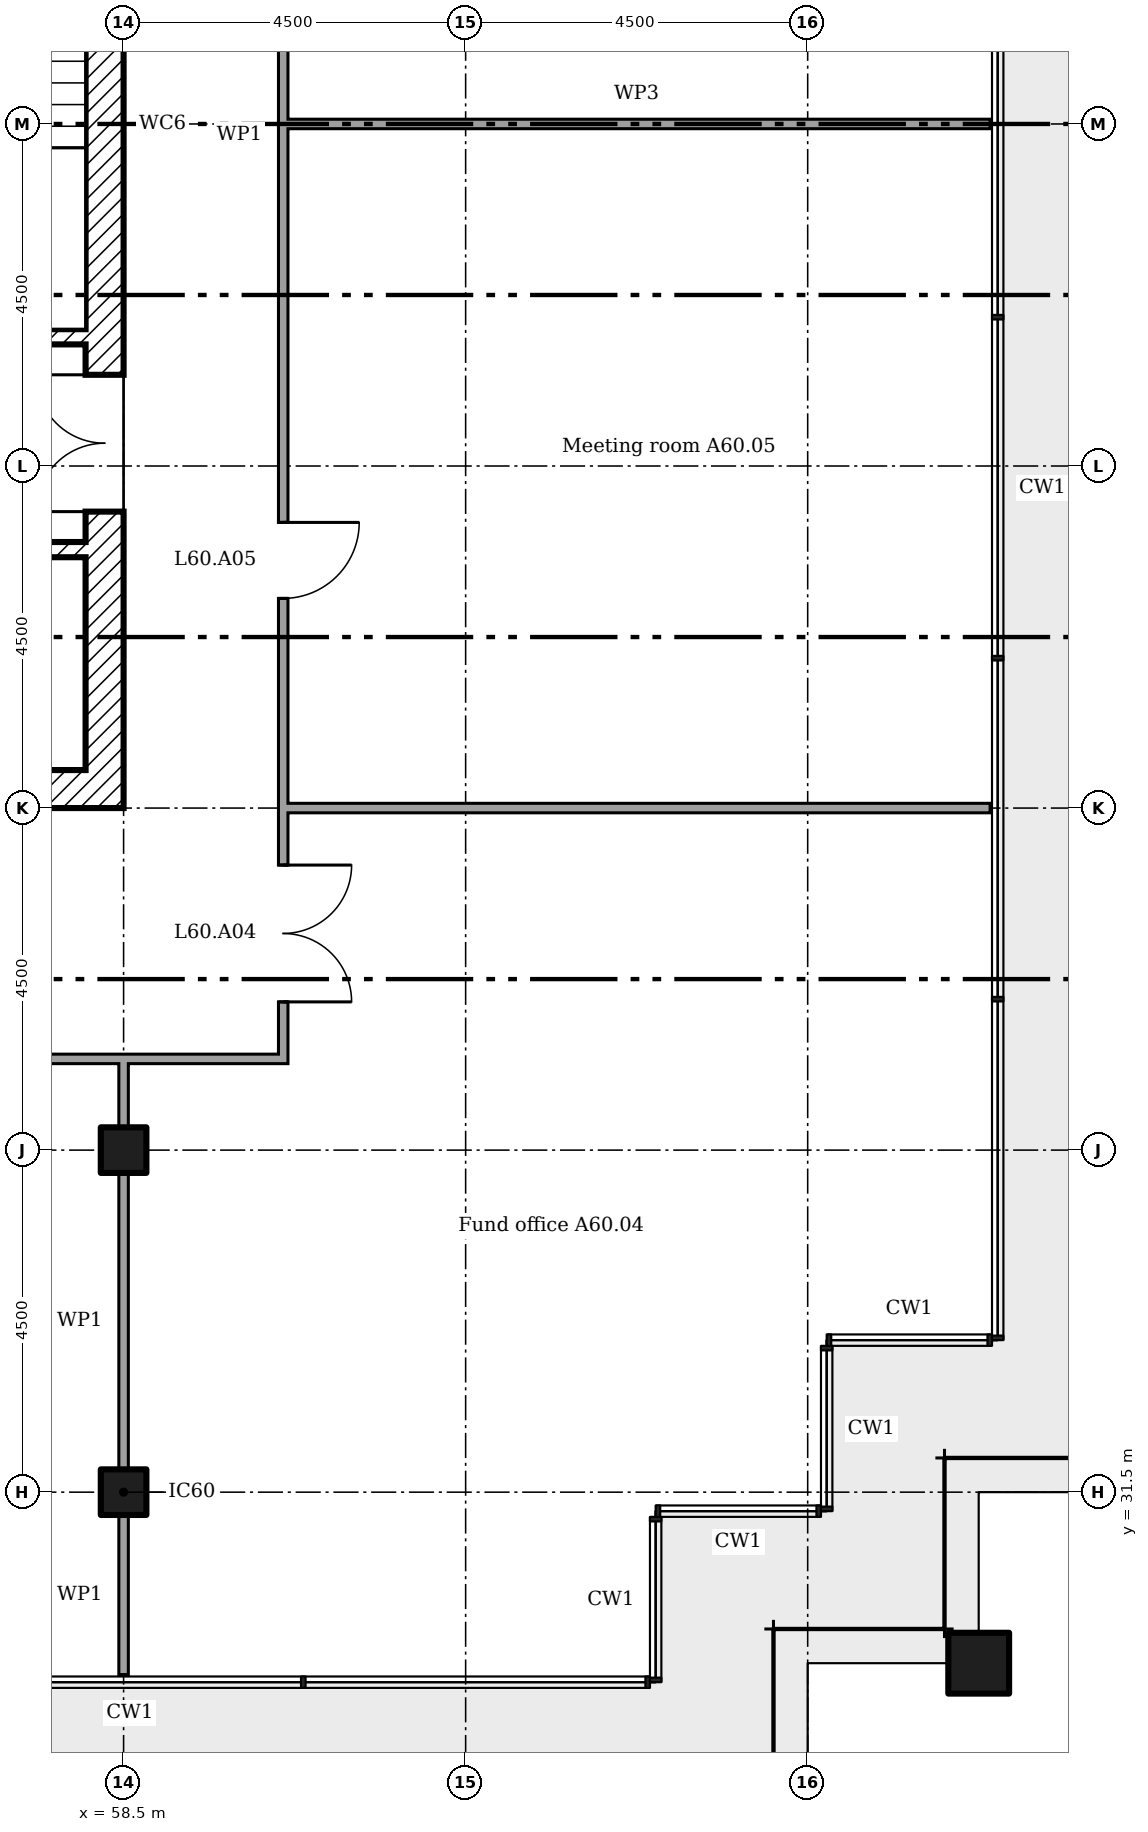
"""IFC4 building model, lengths in metres.
Left out: names, types, materials, properties, quantities, classifications, styles, units other than length and angle.
Written with IfcOpenShell. Run it as: python <this file> out.ifc"""

import sys

from ifc_helpers import new_model, si_unit, direction, frame, frame_2d, origin, origin_2d, place, context, subcontext, project, spatial, rectangle, extrude, element, fill, save


model = new_model("IFC4")
c1 = context("Model", 3, precision=1e-05, world=origin(), true_north=direction((0.0, 1.0)))
c2 = subcontext(c1, "Body", "Model", "MODEL_VIEW")
j1 = project(units=[si_unit("LENGTHUNIT", "METRE"), si_unit("PLANEANGLEUNIT", "RADIAN")], contexts=[c1])
p1 = place(None, origin())
s1 = spatial("IfcSite", under=j1, at=p1, CompositionType="ELEMENT")
p2 = place(p1, origin())
s2 = spatial("IfcBuilding", under=s1, at=p2, CompositionType="ELEMENT")
p3 = place(p2, frame((0.0, 0.0, 235.2)))
s3 = spatial("IfcBuildingStorey", under=s2, at=p3, CompositionType="ELEMENT", Elevation=235.2)
p4 = place(p3, frame((69.75, 29.25, 0.0)))
e1 = element("IfcColumn", 1, at=p4, inside=s3, PredefinedType="COLUMN", context=c2, shape_type="SweptSolid", body=[
    extrude(rectangle(XDim=0.8, YDim=0.8, at=origin_2d()), origin(), (0.0, 0.0, 1.0), 3.6),
])
for number, where in (
    (2, (58.5, 31.5, 0.0)),
    (3, (58.5, 36.0, 0.0)),
):
    element("IfcColumn", number, at=place(p3, frame(where)), inside=s3, PredefinedType="COLUMN", context=c2, shape_type="SweptSolid", body=[
        extrude(rectangle(XDim=0.6, YDim=0.6, at=origin_2d()), origin(), (0.0, 0.0, 1.0), 3.6),
    ])
p5 = place(p3, frame((58.25, 40.5, 0.0), z_axis=(0.0, 0.0, 1.0), x_axis=(0.0, 1.0, 0.0)))
e4 = element("IfcWall", 4, at=p5, inside=s3, PredefinedType="SHEAR", context=c2, shape_type="SweptSolid", body=[
    extrude(rectangle(XDim=18.0, YDim=0.5, at=frame_2d((9.0, 0.0))), origin(), (0.0, 0.0, 1.0), 3.35),
])
p6 = place(p5, frame((13.15, 0.0, 0.0)))
e5 = element("IfcOpeningElement", 5, at=p6, cuts=e4, PredefinedType="OPENING", context=c2, shape_type="SweptSolid", body=[
    extrude(rectangle(XDim=1.2, YDim=2.1, at=frame_2d((0.6, 1.05))), frame((0.0, 0.26, 0.0), z_axis=(0.0, -1.0, 0.0), x_axis=(1.0, 0.0, 0.0)), (0.0, 0.0, 1.0), 0.52),
])
p7 = place(p5, frame((3.9, 0.0, 0.0)))
e6 = element("IfcOpeningElement", 6, at=p7, cuts=e4, PredefinedType="OPENING", context=c2, shape_type="SweptSolid", body=[
    extrude(rectangle(XDim=1.8, YDim=2.1, at=frame_2d((0.9, 1.05))), frame((0.0, 0.26, 0.0), z_axis=(0.0, -1.0, 0.0), x_axis=(1.0, 0.0, 0.0)), (0.0, 0.0, 1.0), 0.52),
])
p8 = place(p5, frame((11.525, 0.0, 0.0)))
e7 = element("IfcOpeningElement", 7, at=p8, cuts=e4, PredefinedType="OPENING", context=c2, shape_type="SweptSolid", body=[
    extrude(rectangle(XDim=1.0, YDim=2.1, at=frame_2d((0.5, 1.05))), frame((0.0, 0.26, 0.0), z_axis=(0.0, -1.0, 0.0), x_axis=(1.0, 0.0, 0.0)), (0.0, 0.0, 1.0), 0.52),
])
p9 = place(p3, frame((40.5, 40.75, 0.0)))
e8 = element("IfcWall", 8, at=p9, inside=s3, PredefinedType="SHEAR", context=c2, shape_type="SweptSolid", body=[
    extrude(rectangle(XDim=17.5, YDim=0.5, at=frame_2d((8.75, 0.0))), origin(), (0.0, 0.0, 1.0), 3.35),
])
p10 = place(p3, frame((41.0, 43.9, 0.0)))
e9 = element("IfcWall", 9, at=p10, inside=s3, PredefinedType="SHEAR", context=c2, shape_type="SweptSolid", body=[
    extrude(rectangle(XDim=17.0, YDim=0.2, at=frame_2d((8.5, 0.0))), origin(), (0.0, 0.0, 1.0), 3.35),
])
p11 = place(p10, frame((6.717, 0.0, 0.0)))
e10 = element("IfcOpeningElement", 10, at=p11, cuts=e9, PredefinedType="OPENING", context=c2, shape_type="SweptSolid", body=[
    extrude(rectangle(XDim=0.9, YDim=2.1, at=frame_2d((0.45, 1.05))), frame((0.0, 0.11, 0.0), z_axis=(0.0, -1.0, 0.0), x_axis=(1.0, 0.0, 0.0)), (0.0, 0.0, 1.0), 0.22),
])
p12 = place(p3, frame((54.8, 46.7, 0.0)))
e11 = element("IfcWall", 11, at=p12, inside=s3, PredefinedType="SHEAR", context=c2, shape_type="SweptSolid", body=[
    extrude(rectangle(XDim=3.2, YDim=0.2, at=frame_2d((1.6, 0.0))), origin(), (0.0, 0.0, 1.0), 3.35),
])
p13 = place(p3, frame((38.038, 37.2, 0.0)))
e12 = element("IfcWall", 12, at=p13, inside=s3, PredefinedType="PARTITIONING", context=c2, shape_type="SweptSolid", body=[
    extrude(rectangle(XDim=22.625, YDim=0.125, at=frame_2d((11.312, 0.0))), origin(), (0.0, 0.0, 1.0), 3.45),
])
p14 = place(p13, frame((0.762, 0.0, 0.0)))
e13 = element("IfcOpeningElement", 13, at=p14, cuts=e12, PredefinedType="OPENING", context=c2, shape_type="SweptSolid", body=[
    extrude(rectangle(XDim=1.0, YDim=2.1, at=frame_2d((0.5, 1.05))), frame((0.0, 0.073, 0.0), z_axis=(0.0, -1.0, 0.0), x_axis=(1.0, 0.0, 0.0)), (0.0, 0.0, 1.0), 0.145),
])
p15 = place(p13, frame((3.758, 0.0, 0.0)))
e14 = element("IfcOpeningElement", 14, at=p15, cuts=e12, PredefinedType="OPENING", context=c2, shape_type="SweptSolid", body=[
    extrude(rectangle(XDim=1.0, YDim=2.1, at=frame_2d((0.5, 1.05))), frame((0.0, 0.073, 0.0), z_axis=(0.0, -1.0, 0.0), x_axis=(1.0, 0.0, 0.0)), (0.0, 0.0, 1.0), 0.145),
])
p16 = place(p13, frame((14.702, 0.0, 0.0)))
e15 = element("IfcOpeningElement", 15, at=p16, cuts=e12, PredefinedType="OPENING", context=c2, shape_type="SweptSolid", body=[
    extrude(rectangle(XDim=1.8, YDim=2.1, at=frame_2d((0.9, 1.05))), frame((0.0, 0.073, 0.0), z_axis=(0.0, -1.0, 0.0), x_axis=(1.0, 0.0, 0.0)), (0.0, 0.0, 1.0), 0.145),
])
p17 = place(p3, frame((60.6, 40.5, 0.0)))
e16 = element("IfcWall", 16, at=p17, inside=s3, PredefinedType="PARTITIONING", context=c2, shape_type="SweptSolid", body=[
    extrude(rectangle(XDim=9.3, YDim=0.125, at=frame_2d((4.65, 0.0))), origin(), (0.0, 0.0, 1.0), 2.772),
])
p18 = place(p3, frame((60.6, 49.5, 0.0)))
e17 = element("IfcWall", 17, at=p18, inside=s3, PredefinedType="MOVABLE", context=c2, shape_type="SweptSolid", body=[
    extrude(rectangle(XDim=9.3, YDim=0.125, at=frame_2d((4.65, 0.0))), origin(), (0.0, 0.0, 1.0), 2.772),
])
p19 = place(p3, frame((58.5, 29.1, 0.0), z_axis=(0.0, 0.0, 1.0), x_axis=(0.0, 1.0, 0.0)))
e18 = element("IfcWall", 18, at=p19, inside=s3, PredefinedType="PARTITIONING", context=c2, shape_type="SweptSolid", body=[
    extrude(rectangle(XDim=2.1, YDim=0.125, at=frame_2d((1.05, 0.0))), origin(), (0.0, 0.0, 1.0), 2.676),
])
p20 = place(p3, frame((58.5, 31.8, 0.0), z_axis=(0.0, 0.0, 1.0), x_axis=(0.0, 1.0, 0.0)))
e19 = element("IfcWall", 19, at=p20, inside=s3, PredefinedType="PARTITIONING", context=c2, shape_type="SweptSolid", body=[
    extrude(rectangle(XDim=3.9, YDim=0.125, at=frame_2d((1.95, 0.0))), origin(), (0.0, 0.0, 1.0), 2.676),
])
p21 = place(p3, frame((58.5, 36.3, 0.0), z_axis=(0.0, 0.0, 1.0), x_axis=(0.0, 1.0, 0.0)))
e20 = element("IfcWall", 20, at=p21, inside=s3, PredefinedType="PARTITIONING", context=c2, shape_type="SweptSolid", body=[
    extrude(rectangle(XDim=0.9, YDim=0.125, at=frame_2d((0.45, 0.0))), origin(), (0.0, 0.0, 1.0), 2.676),
])
p22 = place(p3, frame((60.6, 37.262, 0.0), z_axis=(0.0, 0.0, 1.0), x_axis=(0.0, 1.0, 0.0)))
e21 = element("IfcWall", 21, at=p22, inside=s3, PredefinedType="PARTITIONING", context=c2, shape_type="SweptSolid", body=[
    extrude(rectangle(XDim=24.175, YDim=0.125, at=frame_2d((12.087, 0.0))), origin(), (0.0, 0.0, 1.0), 3.45),
])
p23 = place(p22, frame((0.688, 0.0, 0.0)))
e22 = element("IfcOpeningElement", 22, at=p23, cuts=e21, PredefinedType="OPENING", context=c2, shape_type="SweptSolid", body=[
    extrude(rectangle(XDim=1.8, YDim=2.1, at=frame_2d((0.9, 1.05))), frame((0.0, 0.073, 0.0), z_axis=(0.0, -1.0, 0.0), x_axis=(1.0, 0.0, 0.0)), (0.0, 0.0, 1.0), 0.145),
])
p24 = place(p22, frame((5.996, 0.0, 0.0)))
e23 = element("IfcOpeningElement", 23, at=p24, cuts=e21, PredefinedType="OPENING", context=c2, shape_type="SweptSolid", body=[
    extrude(rectangle(XDim=1.0, YDim=2.1, at=frame_2d((0.5, 1.05))), frame((0.0, 0.073, 0.0), z_axis=(0.0, -1.0, 0.0), x_axis=(1.0, 0.0, 0.0)), (0.0, 0.0, 1.0), 0.145),
])
p25 = place(p22, frame((17.479, 0.0, 0.0)))
e24 = element("IfcOpeningElement", 24, at=p25, cuts=e21, PredefinedType="OPENING", context=c2, shape_type="SweptSolid", body=[
    extrude(rectangle(XDim=1.0, YDim=2.1, at=frame_2d((0.5, 1.05))), frame((0.0, 0.073, 0.0), z_axis=(0.0, -1.0, 0.0), x_axis=(1.0, 0.0, 0.0)), (0.0, 0.0, 1.0), 0.145),
])
p26 = place(p22, frame((21.837, 0.0, 0.0)))
e25 = element("IfcOpeningElement", 25, at=p26, cuts=e21, PredefinedType="OPENING", context=c2, shape_type="SweptSolid", body=[
    extrude(rectangle(XDim=1.8, YDim=2.1, at=frame_2d((0.9, 1.05))), frame((0.0, 0.073, 0.0), z_axis=(0.0, -1.0, 0.0), x_axis=(1.0, 0.0, 0.0)), (0.0, 0.0, 1.0), 0.145),
])
p27 = place(p7, origin())
e26 = element("IfcDoor", 26, at=p27, inside=s3, OperationType="DOUBLE_DOOR_SINGLE_SWING", PredefinedType="DOOR", context=c2, shape_type="SweptSolid", body=[
    extrude(rectangle(XDim=1.8, YDim=2.1, at=frame_2d((0.9, 1.05))), frame((0.0, 0.025, 0.0), z_axis=(0.0, -1.0, 0.0), x_axis=(1.0, 0.0, 0.0)), (0.0, 0.0, 1.0), 0.05),
])
fill(e6, e26)
p28 = place(p23, frame((1.8, 0.0, 0.0), x_axis=(-1.0, 0.0, 0.0)))
e27 = element("IfcDoor", 27, at=p28, inside=s3, OperationType="DOUBLE_DOOR_SINGLE_SWING", PredefinedType="DOOR", context=c2, shape_type="SweptSolid", body=[
    extrude(rectangle(XDim=1.8, YDim=2.1, at=frame_2d((0.9, 1.05))), frame((0.0, 0.025, 0.0), z_axis=(0.0, -1.0, 0.0), x_axis=(1.0, 0.0, 0.0)), (0.0, 0.0, 1.0), 0.05),
])
fill(e22, e27)
p29 = place(p24, frame((1.0, 0.0, 0.0), x_axis=(-1.0, 0.0, 0.0)))
e28 = element("IfcDoor", 28, at=p29, inside=s3, OperationType="SINGLE_SWING_RIGHT", PredefinedType="DOOR", context=c2, shape_type="SweptSolid", body=[
    extrude(rectangle(XDim=1.0, YDim=2.1, at=frame_2d((0.5, 1.05))), frame((0.0, 0.025, 0.0), z_axis=(0.0, -1.0, 0.0), x_axis=(1.0, 0.0, 0.0)), (0.0, 0.0, 1.0), 0.05),
])
fill(e23, e28)
save(model, sys.argv[1])
